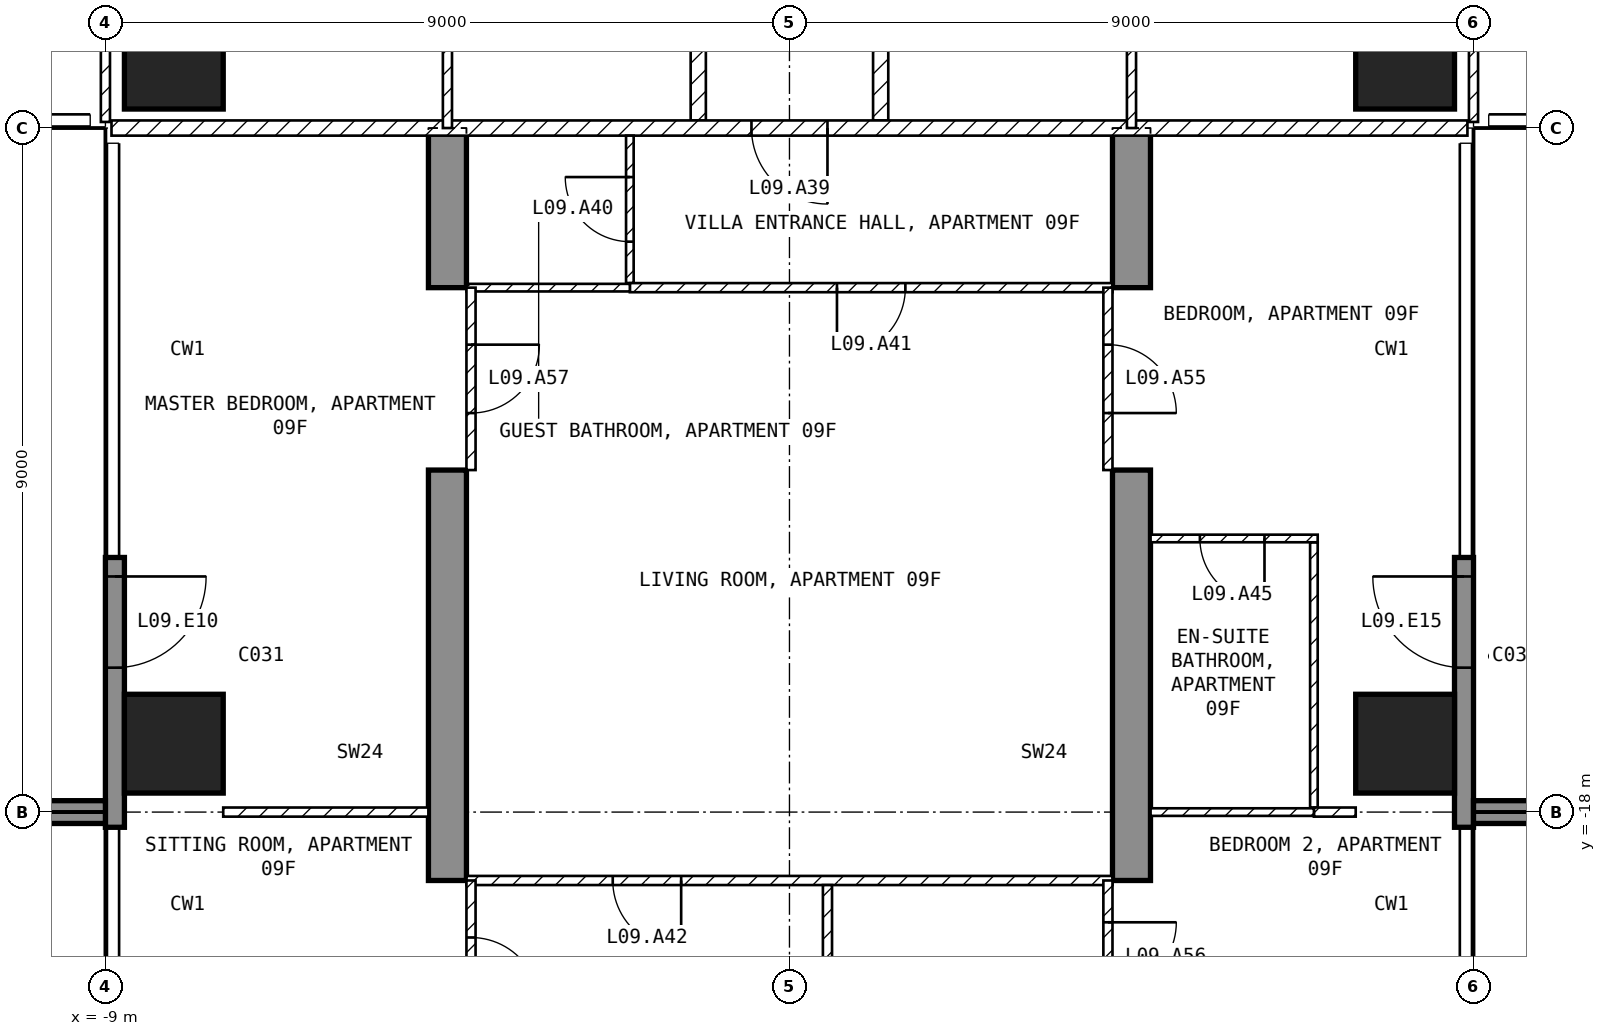
"""IFC4 building model, lengths in metres.
Left out: names, types, materials, properties, quantities, classifications, styles, units other than length and angle.
Written with IfcOpenShell. Run it as: python <this file> out.ifc"""

import sys

from ifc_helpers import new_model, si_unit, direction, frame, frame_2d, origin, origin_2d, place, context, subcontext, project, spatial, polyline, rectangle, outline, extrude, element, fill, save


model = new_model("IFC4")
c1 = context("Model", 3, precision=1e-05, world=origin(), true_north=direction((0.0, 1.0)))
c2 = subcontext(c1, "Body", "Model", "MODEL_VIEW")
j1 = project(units=[si_unit("LENGTHUNIT", "METRE"), si_unit("PLANEANGLEUNIT", "RADIAN")], contexts=[c1])
p1 = place(None, origin())
s1 = spatial("IfcSite", under=j1, at=p1, CompositionType="ELEMENT")
p2 = place(p1, origin())
s2 = spatial("IfcBuilding", under=s1, at=p2, CompositionType="ELEMENT")
p3 = place(p2, frame((0.0, 0.0, 50.5)))
s3 = spatial("IfcBuildingStorey", under=s2, at=p3, CompositionType="ELEMENT", Elevation=50.5)
for number, where, z_axis, x_axis in (
    (1, (-8.1, -17.1, -0.25), (0.0, 0.0, 1.0), (1.0, 0.0, 0.0)),
    (2, (-8.1, -8.1, -0.25), (0.0, 0.0, 1.0), (1.0, 0.0, 0.0)),
    (3, (8.1, -17.1, -0.25), (0.0, 0.0, 1.0), (1.0, 0.0, 0.0)),
    (4, (8.1, -8.1, -0.25), (0.0, 0.0, 1.0), (1.0, 0.0, 0.0)),
):
    element("IfcColumn", number, at=place(p3, frame(where, z_axis=z_axis, x_axis=x_axis)), inside=s3, PredefinedType="COLUMN", context=c2, shape_type="SweptSolid", body=[
        extrude(rectangle(XDim=1.3, YDim=1.3, at=origin_2d()), origin(), (0.0, 0.0, 1.0), 3.5),
    ])
for number, where, z_axis, x_axis in (
    (5, (-4.75, -25.45, -0.25), (1.0, 0.0, 0.0), (0.0, 1.0, 0.0)),
    (6, (4.25, -25.45, -0.25), (1.0, 0.0, 0.0), (0.0, 1.0, 0.0)),
):
    element("IfcWall", number, at=place(p3, frame(where, z_axis=z_axis, x_axis=x_axis)), inside=s3, PredefinedType="SHEAR", context=c2, shape_type="SweptSolid", body=[
        extrude(outline(polyline([(0.0, 0.0), (4.15, 0.0), (4.15, 2.65), (6.55, 2.65), (6.55, 0.0), (11.95, 0.0), (11.95, 2.65), (14.35, 2.65), (14.35, 0.0), (16.45, 0.0), (16.45, 3.5), (0.0, 3.5), (0.0, 0.0)])), origin(), (0.0, 0.0, 1.0), 0.5),
    ])
p4 = place(p3, frame((-8.875, -14.65, 0.0), z_axis=(0.0, 0.0, 1.0), x_axis=(0.0, -1.0, 0.0)))
e7 = element("IfcWall", 7, at=p4, inside=s3, PredefinedType="SOLIDWALL", context=c2, shape_type="SweptSolid", body=[
    extrude(rectangle(XDim=3.55, YDim=0.25, at=frame_2d((1.775, 0.0))), origin(), (0.0, 0.0, 1.0), 3.25),
])
p5 = place(p4, frame((0.25, 0.0, 0.0)))
e8 = element("IfcOpeningElement", 8, at=p5, cuts=e7, PredefinedType="OPENING", context=c2, shape_type="SweptSolid", body=[
    extrude(rectangle(XDim=1.2, YDim=2.4, at=frame_2d((0.6, 1.2))), frame((0.0, 0.135, 0.0), z_axis=(0.0, -1.0, 0.0), x_axis=(1.0, 0.0, 0.0)), (0.0, 0.0, 1.0), 0.27),
])
p6 = place(p3, frame((8.875, -18.2, 0.0), z_axis=(0.0, 0.0, 1.0), x_axis=(0.0, 1.0, 0.0)))
e9 = element("IfcWall", 9, at=p6, inside=s3, PredefinedType="SOLIDWALL", context=c2, shape_type="SweptSolid", body=[
    extrude(rectangle(XDim=3.55, YDim=0.25, at=frame_2d((1.775, 0.0))), origin(), (0.0, 0.0, 1.0), 3.25),
])
p7 = place(p6, frame((2.1, 0.0, 0.0)))
e10 = element("IfcOpeningElement", 10, at=p7, cuts=e9, PredefinedType="OPENING", context=c2, shape_type="SweptSolid", body=[
    extrude(rectangle(XDim=1.2, YDim=2.4, at=frame_2d((0.6, 1.2))), frame((0.0, 0.135, 0.0), z_axis=(0.0, -1.0, 0.0), x_axis=(1.0, 0.0, 0.0)), (0.0, 0.0, 1.0), 0.27),
])
for number, where, z_axis, x_axis in (
    (11, (-9.0, -18.0, 0.0), (0.0, 0.0, 1.0), (-1.0, 0.0, 0.0)),
    (12, (9.0, -18.0, 0.0), (0.0, 0.0, 1.0), (1.0, 0.0, 0.0)),
):
    element("IfcWall", number, at=place(p3, frame(where, z_axis=z_axis, x_axis=x_axis)), inside=s3, PredefinedType="SOLIDWALL", context=c2, shape_type="SweptSolid", body=[
        extrude(rectangle(XDim=2.7, YDim=0.3, at=frame_2d((1.35, 0.0))), origin(), (0.0, 0.0, 1.0), 3.25),
    ])
for number, where, z_axis, x_axis in (
    (13, (1.2, -1.3, 0.0), (0.0, 0.0, 1.0), (0.0, -1.0, 0.0)),
    (14, (-1.2, -8.9, 0.0), (0.0, 0.0, 1.0), (0.0, 1.0, 0.0)),
):
    element("IfcWall", number, at=place(p3, frame(where, z_axis=z_axis, x_axis=x_axis)), inside=s3, PredefinedType="PARTITIONING", context=c2, shape_type="SweptSolid", body=[
        extrude(rectangle(XDim=7.6, YDim=0.2, at=frame_2d((3.8, 0.0))), origin(), (0.0, 0.0, 1.0), 3.25),
    ])
p8 = place(p3, frame((8.92, -9.0, 0.0), z_axis=(0.0, 0.0, 1.0), x_axis=(-1.0, 0.0, 0.0)))
e15 = element("IfcWall", 15, at=p8, inside=s3, PredefinedType="PARTITIONING", context=c2, shape_type="SweptSolid", body=[
    extrude(rectangle(XDim=17.84, YDim=0.2, at=frame_2d((8.92, 0.0))), origin(), (0.0, 0.0, 1.0), 3.25),
])
p9 = place(p8, frame((8.42, 0.0, 0.0)))
e16 = element("IfcOpeningElement", 16, at=p9, cuts=e15, PredefinedType="OPENING", context=c2, shape_type="SweptSolid", body=[
    extrude(rectangle(XDim=1.0, YDim=2.1, at=frame_2d((0.5, 1.05))), frame((0.0, 0.11, 0.0), z_axis=(0.0, -1.0, 0.0), x_axis=(1.0, 0.0, 0.0)), (0.0, 0.0, 1.0), 0.22),
])
p10 = place(p3, frame((9.0, -8.92, 0.0), z_axis=(0.0, 0.0, 1.0), x_axis=(0.0, 1.0, 0.0)))
e17 = element("IfcWall", 17, at=p10, inside=s3, PredefinedType="PARTITIONING", context=c2, shape_type="SweptSolid", body=[
    extrude(rectangle(XDim=7.62, YDim=0.12, at=frame_2d((3.81, 0.0))), origin(), (0.0, 0.0, 1.0), 3.25),
])
p11 = place(p10, frame((2.67, 0.0, 0.0)))
e18 = element("IfcOpeningElement", 18, at=p11, cuts=e17, PredefinedType="OPENING", context=c2, shape_type="SweptSolid", body=[
    extrude(rectangle(XDim=0.9, YDim=2.1, at=frame_2d((0.45, 1.05))), frame((0.0, 0.07, 0.0), z_axis=(0.0, -1.0, 0.0), x_axis=(1.0, 0.0, 0.0)), (0.0, 0.0, 1.0), 0.14),
])
p12 = place(p3, frame((4.5, -9.0, 0.0), z_axis=(0.0, 0.0, 1.0), x_axis=(0.0, 1.0, 0.0)))
e19 = element("IfcWall", 19, at=p12, inside=s3, PredefinedType="PARTITIONING", context=c2, shape_type="SweptSolid", body=[
    extrude(rectangle(XDim=3.9, YDim=0.12, at=frame_2d((1.95, 0.0))), origin(), (0.0, 0.0, 1.0), 3.25),
])
p13 = place(p12, frame((1.5, 0.0, 0.0)))
e20 = element("IfcOpeningElement", 20, at=p13, cuts=e19, PredefinedType="OPENING", context=c2, shape_type="SweptSolid", body=[
    extrude(rectangle(XDim=0.9, YDim=2.1, at=frame_2d((0.45, 1.05))), frame((0.0, 0.07, 0.0), z_axis=(0.0, -1.0, 0.0), x_axis=(1.0, 0.0, 0.0)), (0.0, 0.0, 1.0), 0.14),
])
p14 = place(p3, frame((-9.0, -4.56, 0.0), z_axis=(0.0, 0.0, 1.0), x_axis=(0.0, -1.0, 0.0)))
e21 = element("IfcWall", 21, at=p14, inside=s3, PredefinedType="PARTITIONING", context=c2, shape_type="SweptSolid", body=[
    extrude(rectangle(XDim=4.36, YDim=0.12, at=frame_2d((2.18, 0.0))), origin(), (0.0, 0.0, 1.0), 3.25),
])
p15 = place(p14, frame((0.77, 0.0, 0.0)))
e22 = element("IfcOpeningElement", 22, at=p15, cuts=e21, PredefinedType="OPENING", context=c2, shape_type="SweptSolid", body=[
    extrude(rectangle(XDim=0.9, YDim=2.1, at=frame_2d((0.45, 1.05))), frame((0.0, 0.07, 0.0), z_axis=(0.0, -1.0, 0.0), x_axis=(1.0, 0.0, 0.0)), (0.0, 0.0, 1.0), 0.14),
])
p16 = place(p3, frame((-4.5, -1.3, 0.0), z_axis=(0.0, 0.0, 1.0), x_axis=(0.0, -1.0, 0.0)))
e23 = element("IfcWall", 23, at=p16, inside=s3, PredefinedType="PARTITIONING", context=c2, shape_type="SweptSolid", body=[
    extrude(rectangle(XDim=7.7, YDim=0.12, at=frame_2d((3.85, 0.0))), origin(), (0.0, 0.0, 1.0), 3.25),
])
p17 = place(p16, frame((4.988, 0.0, 0.0)))
e24 = element("IfcOpeningElement", 24, at=p17, cuts=e23, PredefinedType="OPENING", context=c2, shape_type="SweptSolid", body=[
    extrude(rectangle(XDim=0.9, YDim=2.1, at=frame_2d((0.45, 1.05))), frame((0.0, 0.07, 0.0), z_axis=(0.0, -1.0, 0.0), x_axis=(1.0, 0.0, 0.0)), (0.0, 0.0, 1.0), 0.14),
])
p18 = place(p3, frame((-2.1, -11.04, 0.0), z_axis=(0.0, 0.0, 1.0), x_axis=(0.0, 1.0, 0.0)))
e25 = element("IfcWall", 25, at=p18, inside=s3, PredefinedType="PARTITIONING", context=c2, shape_type="SweptSolid", body=[
    extrude(rectangle(XDim=1.94, YDim=0.1, at=frame_2d((0.97, 0.0))), origin(), (0.0, 0.0, 1.0), 3.25),
])
p19 = place(p18, frame((0.545, 0.0, 0.0)))
e26 = element("IfcOpeningElement", 26, at=p19, cuts=e25, PredefinedType="OPENING", context=c2, shape_type="SweptSolid", body=[
    extrude(rectangle(XDim=0.85, YDim=2.1, at=frame_2d((0.425, 1.05))), frame((0.0, 0.06, 0.0), z_axis=(0.0, -1.0, 0.0), x_axis=(1.0, 0.0, 0.0)), (0.0, 0.0, 1.0), 0.12),
])
p20 = place(p3, frame((4.25, -11.1, 0.0), z_axis=(0.0, 0.0, 1.0), x_axis=(-1.0, 0.0, 0.0)))
e27 = element("IfcWall", 27, at=p20, inside=s3, PredefinedType="PARTITIONING", context=c2, shape_type="SweptSolid", body=[
    extrude(rectangle(XDim=6.35, YDim=0.12, at=frame_2d((3.175, 0.0))), origin(), (0.0, 0.0, 1.0), 3.25),
])
p21 = place(p20, frame((2.725, 0.0, 0.0)))
e28 = element("IfcOpeningElement", 28, at=p21, cuts=e27, PredefinedType="OPENING", context=c2, shape_type="SweptSolid", body=[
    extrude(rectangle(XDim=0.9, YDim=2.1, at=frame_2d((0.45, 1.05))), frame((0.0, 0.07, 0.0), z_axis=(0.0, -1.0, 0.0), x_axis=(1.0, 0.0, 0.0)), (0.0, 0.0, 1.0), 0.14),
])
p22 = place(p3, frame((-2.1, -11.1, 0.0), z_axis=(0.0, 0.0, 1.0), x_axis=(-1.0, 0.0, 0.0)))
e29 = element("IfcWall", 29, at=p22, inside=s3, PredefinedType="PARTITIONING", context=c2, shape_type="SweptSolid", body=[
    extrude(rectangle(XDim=2.15, YDim=0.1, at=frame_2d((1.075, 0.0))), origin(), (0.0, 0.0, 1.0), 3.25),
])
p23 = place(p3, frame((4.25, -18.9, 0.0), z_axis=(0.0, 0.0, 1.0), x_axis=(-1.0, 0.0, 0.0)))
e30 = element("IfcWall", 30, at=p23, inside=s3, PredefinedType="PARTITIONING", context=c2, shape_type="SweptSolid", body=[
    extrude(rectangle(XDim=8.5, YDim=0.12, at=frame_2d((4.25, 0.0))), origin(), (0.0, 0.0, 1.0), 3.25),
])
p24 = place(p23, frame((5.675, 0.0, 0.0)))
e31 = element("IfcOpeningElement", 31, at=p24, cuts=e30, PredefinedType="OPENING", context=c2, shape_type="SweptSolid", body=[
    extrude(rectangle(XDim=0.9, YDim=2.1, at=frame_2d((0.45, 1.05))), frame((0.0, 0.07, 0.0), z_axis=(0.0, -1.0, 0.0), x_axis=(1.0, 0.0, 0.0)), (0.0, 0.0, 1.0), 0.14),
])
p25 = place(p3, frame((0.5, -18.96, 0.0), z_axis=(0.0, 0.0, 1.0), x_axis=(0.0, -1.0, 0.0)))
e32 = element("IfcWall", 32, at=p25, inside=s3, PredefinedType="PARTITIONING", context=c2, shape_type="SweptSolid", body=[
    extrude(rectangle(XDim=4.38, YDim=0.12, at=frame_2d((2.19, 0.0))), origin(), (0.0, 0.0, 1.0), 3.25),
])
p26 = place(p25, frame((1.74, 0.0, 0.0)))
e33 = element("IfcOpeningElement", 33, at=p26, cuts=e32, PredefinedType="OPENING", context=c2, shape_type="SweptSolid", body=[
    extrude(rectangle(XDim=0.9, YDim=2.1, at=frame_2d((0.45, 1.05))), frame((0.0, 0.07, 0.0), z_axis=(0.0, -1.0, 0.0), x_axis=(1.0, 0.0, 0.0)), (0.0, 0.0, 1.0), 0.14),
])
p27 = place(p3, frame((6.9, -17.94, 0.0), z_axis=(0.0, 0.0, 1.0), x_axis=(0.0, 1.0, 0.0)))
e34 = element("IfcWall", 34, at=p27, inside=s3, PredefinedType="PARTITIONING", context=c2, shape_type="SweptSolid", body=[
    extrude(rectangle(XDim=3.49, YDim=0.1, at=frame_2d((1.745, 0.0))), origin(), (0.0, 0.0, 1.0), 3.25),
])
p28 = place(p3, frame((6.95, -14.4, 0.0), z_axis=(0.0, 0.0, 1.0), x_axis=(-1.0, 0.0, 0.0)))
e35 = element("IfcWall", 35, at=p28, inside=s3, PredefinedType="PARTITIONING", context=c2, shape_type="SweptSolid", body=[
    extrude(rectangle(XDim=2.2, YDim=0.1, at=frame_2d((1.1, 0.0))), origin(), (0.0, 0.0, 1.0), 3.25),
])
p29 = place(p28, frame((0.7, 0.0, 0.0)))
e36 = element("IfcOpeningElement", 36, at=p29, cuts=e35, PredefinedType="OPENING", context=c2, shape_type="SweptSolid", body=[
    extrude(rectangle(XDim=0.85, YDim=2.1, at=frame_2d((0.425, 1.05))), frame((0.0, 0.06, 0.0), z_axis=(0.0, -1.0, 0.0), x_axis=(1.0, 0.0, 0.0)), (0.0, 0.0, 1.0), 0.12),
])
p30 = place(p3, frame((7.45, -18.0, 0.0), z_axis=(0.0, 0.0, 1.0), x_axis=(-1.0, 0.0, 0.0)))
e37 = element("IfcWall", 37, at=p30, inside=s3, PredefinedType="PARTITIONING", context=c2, shape_type="SweptSolid", body=[
    extrude(rectangle(XDim=0.55, YDim=0.12, at=frame_2d((0.275, 0.0))), origin(), (0.0, 0.0, 1.0), 3.25),
])
p31 = place(p3, frame((6.9, -18.0, 0.0), z_axis=(0.0, 0.0, 1.0), x_axis=(-1.0, 0.0, 0.0)))
e38 = element("IfcWall", 38, at=p31, inside=s3, PredefinedType="PARTITIONING", context=c2, shape_type="SweptSolid", body=[
    extrude(rectangle(XDim=2.15, YDim=0.1, at=frame_2d((1.075, 0.0))), origin(), (0.0, 0.0, 1.0), 3.25),
])
p32 = place(p3, frame((-4.75, -18.0, 0.0), z_axis=(0.0, 0.0, 1.0), x_axis=(-1.0, 0.0, 0.0)))
e39 = element("IfcWall", 39, at=p32, inside=s3, PredefinedType="PARTITIONING", context=c2, shape_type="SweptSolid", body=[
    extrude(rectangle(XDim=2.7, YDim=0.12, at=frame_2d((1.35, 0.0))), origin(), (0.0, 0.0, 1.0), 3.25),
])
p33 = place(p3, frame((4.19, -11.1, 0.0), z_axis=(0.0, 0.0, 1.0), x_axis=(0.0, -1.0, 0.0)))
e40 = element("IfcWall", 40, at=p33, inside=s3, PredefinedType="PARTITIONING", context=c2, shape_type="SweptSolid", body=[
    extrude(rectangle(XDim=2.4, YDim=0.12, at=frame_2d((1.2, 0.0))), origin(), (0.0, 0.0, 1.0), 2.4),
])
p34 = place(p33, frame((0.75, 0.0, 0.0)))
e41 = element("IfcOpeningElement", 41, at=p34, cuts=e40, PredefinedType="OPENING", context=c2, shape_type="SweptSolid", body=[
    extrude(rectangle(XDim=0.9, YDim=2.1, at=frame_2d((0.45, 1.05))), frame((0.0, 0.07, 0.0), z_axis=(0.0, -1.0, 0.0), x_axis=(1.0, 0.0, 0.0)), (0.0, 0.0, 1.0), 0.14),
])
p35 = place(p3, frame((4.19, -18.9, 0.0), z_axis=(0.0, 0.0, 1.0), x_axis=(0.0, -1.0, 0.0)))
e42 = element("IfcWall", 42, at=p35, inside=s3, PredefinedType="PARTITIONING", context=c2, shape_type="SweptSolid", body=[
    extrude(rectangle(XDim=2.4, YDim=0.12, at=frame_2d((1.2, 0.0))), origin(), (0.0, 0.0, 1.0), 2.4),
])
p36 = place(p35, frame((0.55, 0.0, 0.0)))
e43 = element("IfcOpeningElement", 43, at=p36, cuts=e42, PredefinedType="OPENING", context=c2, shape_type="SweptSolid", body=[
    extrude(rectangle(XDim=0.9, YDim=2.1, at=frame_2d((0.45, 1.05))), frame((0.0, 0.07, 0.0), z_axis=(0.0, -1.0, 0.0), x_axis=(1.0, 0.0, 0.0)), (0.0, 0.0, 1.0), 0.14),
])
p37 = place(p3, frame((-4.19, -11.1, 0.0), z_axis=(0.0, 0.0, 1.0), x_axis=(0.0, -1.0, 0.0)))
e44 = element("IfcWall", 44, at=p37, inside=s3, PredefinedType="PARTITIONING", context=c2, shape_type="SweptSolid", body=[
    extrude(rectangle(XDim=2.4, YDim=0.12, at=frame_2d((1.2, 0.0))), origin(), (0.0, 0.0, 1.0), 2.4),
])
p38 = place(p37, frame((0.75, 0.0, 0.0)))
e45 = element("IfcOpeningElement", 45, at=p38, cuts=e44, PredefinedType="OPENING", context=c2, shape_type="SweptSolid", body=[
    extrude(rectangle(XDim=0.9, YDim=2.1, at=frame_2d((0.45, 1.05))), frame((0.0, 0.07, 0.0), z_axis=(0.0, -1.0, 0.0), x_axis=(1.0, 0.0, 0.0)), (0.0, 0.0, 1.0), 0.14),
])
p39 = place(p3, frame((-4.19, -18.9, 0.0), z_axis=(0.0, 0.0, 1.0), x_axis=(0.0, -1.0, 0.0)))
e46 = element("IfcWall", 46, at=p39, inside=s3, PredefinedType="PARTITIONING", context=c2, shape_type="SweptSolid", body=[
    extrude(rectangle(XDim=2.4, YDim=0.12, at=frame_2d((1.2, 0.0))), origin(), (0.0, 0.0, 1.0), 2.4),
])
p40 = place(p39, frame((0.75, 0.0, 0.0)))
e47 = element("IfcOpeningElement", 47, at=p40, cuts=e46, PredefinedType="OPENING", context=c2, shape_type="SweptSolid", body=[
    extrude(rectangle(XDim=0.9, YDim=2.1, at=frame_2d((0.45, 1.05))), frame((0.0, 0.07, 0.0), z_axis=(0.0, -1.0, 0.0), x_axis=(1.0, 0.0, 0.0)), (0.0, 0.0, 1.0), 0.14),
])
p41 = place(p5, origin())
e48 = element("IfcDoor", 48, at=p41, inside=s3, OperationType="SINGLE_SWING_LEFT", PredefinedType="DOOR", context=c2, shape_type="SweptSolid", body=[
    extrude(rectangle(XDim=1.2, YDim=2.4, at=frame_2d((0.6, 1.2))), frame((0.0, 0.025, 0.0), z_axis=(0.0, -1.0, 0.0), x_axis=(1.0, 0.0, 0.0)), (0.0, 0.0, 1.0), 0.05),
])
fill(e8, e48)
p42 = place(p7, origin())
e49 = element("IfcDoor", 49, at=p42, inside=s3, OperationType="SINGLE_SWING_RIGHT", PredefinedType="DOOR", context=c2, shape_type="SweptSolid", body=[
    extrude(rectangle(XDim=1.2, YDim=2.4, at=frame_2d((0.6, 1.2))), frame((0.0, 0.025, 0.0), z_axis=(0.0, -1.0, 0.0), x_axis=(1.0, 0.0, 0.0)), (0.0, 0.0, 1.0), 0.05),
])
fill(e10, e49)
p43 = place(p9, origin())
e50 = element("IfcDoor", 50, at=p43, inside=s3, OperationType="SINGLE_SWING_LEFT", PredefinedType="DOOR", context=c2, shape_type="SweptSolid", body=[
    extrude(rectangle(XDim=1.0, YDim=2.1, at=frame_2d((0.5, 1.05))), frame((0.0, 0.025, 0.0), z_axis=(0.0, -1.0, 0.0), x_axis=(1.0, 0.0, 0.0)), (0.0, 0.0, 1.0), 0.05),
])
fill(e16, e50)
p44 = place(p19, origin())
e51 = element("IfcDoor", 51, at=p44, inside=s3, OperationType="SINGLE_SWING_RIGHT", PredefinedType="DOOR", context=c2, shape_type="SweptSolid", body=[
    extrude(rectangle(XDim=0.85, YDim=2.1, at=frame_2d((0.425, 1.05))), frame((0.0, 0.025, 0.0), z_axis=(0.0, -1.0, 0.0), x_axis=(1.0, 0.0, 0.0)), (0.0, 0.0, 1.0), 0.05),
])
fill(e26, e51)
p45 = place(p21, origin())
e52 = element("IfcDoor", 52, at=p45, inside=s3, OperationType="SINGLE_SWING_RIGHT", PredefinedType="DOOR", context=c2, shape_type="SweptSolid", body=[
    extrude(rectangle(XDim=0.9, YDim=2.1, at=frame_2d((0.45, 1.05))), frame((0.0, 0.025, 0.0), z_axis=(0.0, -1.0, 0.0), x_axis=(1.0, 0.0, 0.0)), (0.0, 0.0, 1.0), 0.05),
])
fill(e28, e52)
p46 = place(p24, origin())
e53 = element("IfcDoor", 53, at=p46, inside=s3, OperationType="SINGLE_SWING_LEFT", PredefinedType="DOOR", context=c2, shape_type="SweptSolid", body=[
    extrude(rectangle(XDim=0.9, YDim=2.1, at=frame_2d((0.45, 1.05))), frame((0.0, 0.025, 0.0), z_axis=(0.0, -1.0, 0.0), x_axis=(1.0, 0.0, 0.0)), (0.0, 0.0, 1.0), 0.05),
])
fill(e31, e53)
p47 = place(p29, origin())
e54 = element("IfcDoor", 54, at=p47, inside=s3, OperationType="SINGLE_SWING_LEFT", PredefinedType="DOOR", context=c2, shape_type="SweptSolid", body=[
    extrude(rectangle(XDim=0.85, YDim=2.1, at=frame_2d((0.425, 1.05))), frame((0.0, 0.025, 0.0), z_axis=(0.0, -1.0, 0.0), x_axis=(1.0, 0.0, 0.0)), (0.0, 0.0, 1.0), 0.05),
])
fill(e36, e54)
p48 = place(p34, origin())
e55 = element("IfcDoor", 55, at=p48, inside=s3, OperationType="SINGLE_SWING_RIGHT", PredefinedType="DOOR", context=c2, shape_type="SweptSolid", body=[
    extrude(rectangle(XDim=0.9, YDim=2.1, at=frame_2d((0.45, 1.05))), frame((0.0, 0.025, 0.0), z_axis=(0.0, -1.0, 0.0), x_axis=(1.0, 0.0, 0.0)), (0.0, 0.0, 1.0), 0.05),
])
fill(e41, e55)
p49 = place(p36, origin())
e56 = element("IfcDoor", 56, at=p49, inside=s3, OperationType="SINGLE_SWING_LEFT", PredefinedType="DOOR", context=c2, shape_type="SweptSolid", body=[
    extrude(rectangle(XDim=0.9, YDim=2.1, at=frame_2d((0.45, 1.05))), frame((0.0, 0.025, 0.0), z_axis=(0.0, -1.0, 0.0), x_axis=(1.0, 0.0, 0.0)), (0.0, 0.0, 1.0), 0.05),
])
fill(e43, e56)
p50 = place(p38, origin())
e57 = element("IfcDoor", 57, at=p50, inside=s3, OperationType="SINGLE_SWING_LEFT", PredefinedType="DOOR", context=c2, shape_type="SweptSolid", body=[
    extrude(rectangle(XDim=0.9, YDim=2.1, at=frame_2d((0.45, 1.05))), frame((0.0, 0.025, 0.0), z_axis=(0.0, -1.0, 0.0), x_axis=(1.0, 0.0, 0.0)), (0.0, 0.0, 1.0), 0.05),
])
fill(e45, e57)
p51 = place(p40, origin())
e58 = element("IfcDoor", 58, at=p51, inside=s3, OperationType="SINGLE_SWING_RIGHT", PredefinedType="DOOR", context=c2, shape_type="SweptSolid", body=[
    extrude(rectangle(XDim=0.9, YDim=2.1, at=frame_2d((0.45, 1.05))), frame((0.0, 0.025, 0.0), z_axis=(0.0, -1.0, 0.0), x_axis=(1.0, 0.0, 0.0)), (0.0, 0.0, 1.0), 0.05),
])
fill(e47, e58)
save(model, sys.argv[1])
